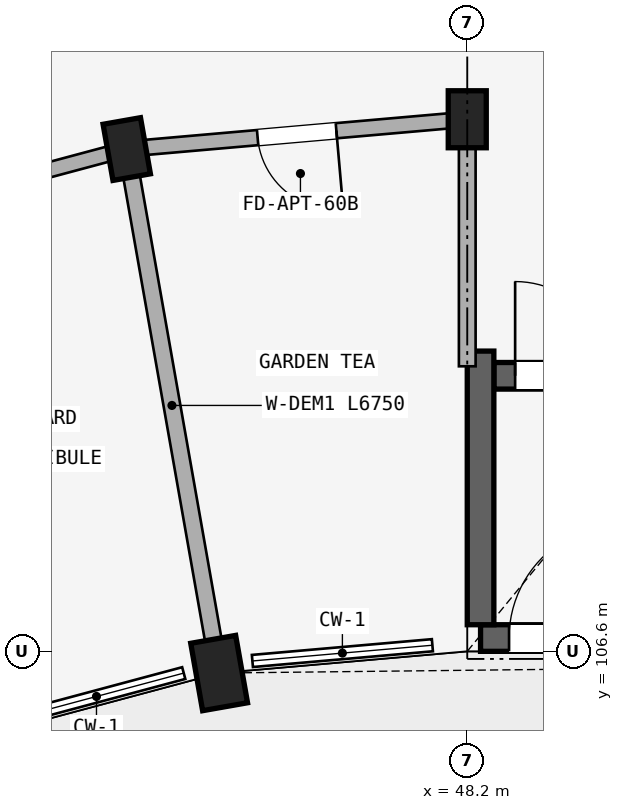
"""IFC4 building model, lengths in metres.
Left out: names, types, materials, properties, quantities, classifications, styles, units other than length and angle.
Written with IfcOpenShell. Run it as: python <this file> out.ifc"""

import sys

from ifc_helpers import new_model, si_unit, direction, frame, frame_2d, origin, origin_2d, place, context, subcontext, project, spatial, rectangle, extrude, element, fill, save


model = new_model("IFC4")
c1 = context("Model", 3, precision=1e-05, world=origin(), true_north=direction((0.0, 1.0)))
c2 = subcontext(c1, "Body", "Model", "MODEL_VIEW")
j1 = project(units=[si_unit("LENGTHUNIT", "METRE"), si_unit("PLANEANGLEUNIT", "RADIAN")], contexts=[c1])
p1 = place(None, origin())
s1 = spatial("IfcSite", under=j1, at=p1, CompositionType="ELEMENT")
p2 = place(p1, origin())
s2 = spatial("IfcBuilding", under=s1, at=p2, CompositionType="ELEMENT")
p3 = place(p2, origin())
s3 = spatial("IfcBuildingStorey", under=s2, at=p3, CompositionType="ELEMENT", Elevation=0.0)
p4 = place(p3, frame((48.375, 106.775, 0.0), z_axis=(0.0, 0.0, 1.0), x_axis=(1.0, 0.0, 0.0)))
e1 = element("IfcWall", 1, at=p4, inside=s3, PredefinedType="SHEAR", context=c2, shape_type="SweptSolid", body=[
    extrude(rectangle(XDim=8.25, YDim=0.35, at=frame_2d((4.125, 0.0))), origin(), (0.0, 0.0, 1.0), 4.15),
])
p5 = place(p4, frame((0.375, 0.0, 0.0)))
e2 = element("IfcOpeningElement", 2, at=p5, cuts=e1, PredefinedType="OPENING", context=c2, shape_type="SweptSolid", body=[
    extrude(rectangle(XDim=1.5, YDim=2.15, at=frame_2d((0.75, 1.075))), frame((0.0, 0.185, 0.0), z_axis=(0.0, -1.0, 0.0), x_axis=(1.0, 0.0, 0.0)), (0.0, 0.0, 1.0), 0.37),
])
p6 = place(p3, frame((48.55, 110.225, 0.0), z_axis=(0.0, 0.0, 1.0), x_axis=(1.0, 0.0, 0.0)))
e3 = element("IfcWall", 3, at=p6, inside=s3, PredefinedType="SHEAR", context=c2, shape_type="SweptSolid", body=[
    extrude(rectangle(XDim=7.9, YDim=0.35, at=frame_2d((3.95, 0.0))), origin(), (0.0, 0.0, 1.0), 4.15),
])
p7 = place(p6, frame((0.28, 0.0, 0.0)))
e4 = element("IfcOpeningElement", 4, at=p7, cuts=e3, PredefinedType="OPENING", context=c2, shape_type="SweptSolid", body=[
    extrude(rectangle(XDim=1.24, YDim=2.15, at=frame_2d((0.62, 1.075))), frame((0.0, 0.185, 0.0), z_axis=(0.0, -1.0, 0.0), x_axis=(1.0, 0.0, 0.0)), (0.0, 0.0, 1.0), 0.37),
])
p8 = place(p3, frame((48.375, 106.95, 0.0), z_axis=(0.0, 0.0, 1.0), x_axis=(0.0, 1.0, 0.0)))
e5 = element("IfcWall", 5, at=p8, inside=s3, PredefinedType="SHEAR", context=c2, shape_type="SweptSolid", body=[
    extrude(rectangle(XDim=3.6, YDim=0.35, at=frame_2d((1.8, 0.0))), origin(), (0.0, 0.0, 1.0), 4.15),
])
p9 = place(p3, frame((48.2, 113.6, 0.0), z_axis=(0.0, 0.0, 1.0), x_axis=(1.0, 0.0, 0.0)))
e6 = element("IfcColumn", 6, at=p9, inside=s3, PredefinedType="COLUMN", context=c2, shape_type="SweptSolid", body=[
    extrude(rectangle(XDim=0.5, YDim=0.75, at=origin_2d()), origin(), (0.0, 0.0, 1.0), 4.15),
])
p10 = place(p3, frame((44.935, 106.314, 0.0), z_axis=(0.0, 0.0, 1.0), x_axis=(0.984807753012, 0.173648177667, 0.0)))
e7 = element("IfcColumn", 7, at=p10, inside=s3, PredefinedType="COLUMN", context=c2, shape_type="SweptSolid", body=[
    extrude(rectangle(XDim=0.6, YDim=0.9, at=origin_2d()), origin(), (0.0, 0.0, 1.0), 4.15),
])
p11 = place(p3, frame((43.72, 113.208, 0.0), z_axis=(0.0, 0.0, 1.0), x_axis=(0.984807753012, 0.173648177667, 0.0)))
e8 = element("IfcColumn", 8, at=p11, inside=s3, PredefinedType="COLUMN", context=c2, shape_type="SweptSolid", body=[
    extrude(rectangle(XDim=0.5, YDim=0.75, at=origin_2d()), origin(), (0.0, 0.0, 1.0), 4.15),
])
p12 = place(p3, frame((48.2, 113.6, 0.0), z_axis=(0.0, 0.0, 1.0), x_axis=(-0.996191949488, -0.087187153726, 0.0)))
e9 = element("IfcWall", 9, at=p12, inside=s3, PredefinedType="STANDARD", context=c2, shape_type="SweptSolid", body=[
    extrude(rectangle(XDim=4.497, YDim=0.2, at=frame_2d((2.249, 0.0))), origin(), (0.0, 0.0, 1.0), 3.492),
])
p13 = place(p12, frame((1.729, 0.0, 0.0)))
e10 = element("IfcOpeningElement", 10, at=p13, cuts=e9, PredefinedType="OPENING", context=c2, shape_type="SweptSolid", body=[
    extrude(rectangle(XDim=1.04, YDim=2.15, at=frame_2d((0.52, 1.075))), frame((0.0, 0.11, 0.0), z_axis=(0.0, -1.0, 0.0), x_axis=(1.0, 0.0, 0.0)), (0.0, 0.0, 1.0), 0.22),
])
p14 = place(p3, frame((43.72, 113.208, 0.0), z_axis=(0.0, 0.0, 1.0), x_axis=(-0.965934240054, -0.258787642463, 0.0)))
e11 = element("IfcWall", 11, at=p14, inside=s3, PredefinedType="STANDARD", context=c2, shape_type="SweptSolid", body=[
    extrude(rectangle(XDim=4.497, YDim=0.2, at=frame_2d((2.249, 0.0))), origin(), (0.0, 0.0, 1.0), 2.742),
])
p15 = place(p14, frame((1.349, 0.0, 0.0)))
e12 = element("IfcOpeningElement", 12, at=p15, cuts=e11, PredefinedType="OPENING", context=c2, shape_type="SweptSolid", body=[
    extrude(rectangle(XDim=1.8, YDim=2.2, at=frame_2d((0.9, 1.1))), frame((0.0, 0.11, 0.0), z_axis=(0.0, -1.0, 0.0), x_axis=(1.0, 0.0, 0.0)), (0.0, 0.0, 1.0), 0.22),
])
p16 = place(p3, frame((43.303, 115.572, 0.0), z_axis=(0.0, 0.0, 1.0), x_axis=(-0.965930095386, -0.258803112091, 0.0)))
e13 = element("IfcWall", 13, at=p16, inside=s3, PredefinedType="STANDARD", context=c2, shape_type="SweptSolid", body=[
    extrude(rectangle(XDim=4.916, YDim=0.2, at=frame_2d((2.458, 0.0))), origin(), (0.0, 0.0, 1.0), 2.942),
])
p17 = place(p3, frame((48.2, 110.35, 0.0), z_axis=(0.0, 0.0, 1.0), x_axis=(0.0, 1.0, 0.0)))
e14 = element("IfcWall", 14, at=p17, inside=s3, PredefinedType="STANDARD", context=c2, shape_type="SweptSolid", body=[
    extrude(rectangle(XDim=3.2, YDim=0.22, at=frame_2d((1.6, 0.0))), origin(), (0.0, 0.0, 1.0), 3.492),
])
p18 = place(p3, frame((44.901, 106.511, 0.0), z_axis=(0.0, 0.0, 1.0), x_axis=(-0.173647089161, 0.984807944945, 0.0)))
e15 = element("IfcWall", 15, at=p18, inside=s3, PredefinedType="STANDARD", context=c2, shape_type="SweptSolid", body=[
    extrude(rectangle(XDim=6.75, YDim=0.22, at=frame_2d((3.375, 0.0))), origin(), (0.0, 0.0, 1.0), 2.742),
])
p19 = place(p7, origin())
e16 = element("IfcDoor", 16, at=p19, inside=s3, OperationType="SINGLE_SWING_LEFT", PredefinedType="DOOR", context=c2, shape_type="SweptSolid", body=[
    extrude(rectangle(XDim=1.24, YDim=2.15, at=frame_2d((0.62, 1.075))), frame((0.0, 0.025, 0.0), z_axis=(0.0, -1.0, 0.0), x_axis=(1.0, 0.0, 0.0)), (0.0, 0.0, 1.0), 0.05),
])
fill(e4, e16)
p20 = place(p5, frame((1.5, 0.0, 0.0), z_axis=(0.0, 0.0, 1.0), x_axis=(-1.0, 0.0, 0.0)))
e17 = element("IfcDoor", 17, at=p20, inside=s3, OperationType="SINGLE_SWING_LEFT", PredefinedType="DOOR", context=c2, shape_type="SweptSolid", body=[
    extrude(rectangle(XDim=1.5, YDim=2.15, at=frame_2d((0.75, 1.075))), frame((0.0, 0.025, 0.0), z_axis=(0.0, -1.0, 0.0), x_axis=(1.0, 0.0, 0.0)), (0.0, 0.0, 1.0), 0.05),
])
fill(e2, e17)
p21 = place(p13, frame((1.04, 0.0, 0.0), z_axis=(0.0, 0.0, 1.0), x_axis=(-1.0, 0.0, 0.0)))
e18 = element("IfcDoor", 18, at=p21, inside=s3, OperationType="SINGLE_SWING_RIGHT", PredefinedType="DOOR", context=c2, shape_type="SweptSolid", body=[
    extrude(rectangle(XDim=1.04, YDim=2.15, at=frame_2d((0.52, 1.075))), frame((0.0, 0.025, 0.0), z_axis=(0.0, -1.0, 0.0), x_axis=(1.0, 0.0, 0.0)), (0.0, 0.0, 1.0), 0.05),
])
fill(e10, e18)
save(model, sys.argv[1])
